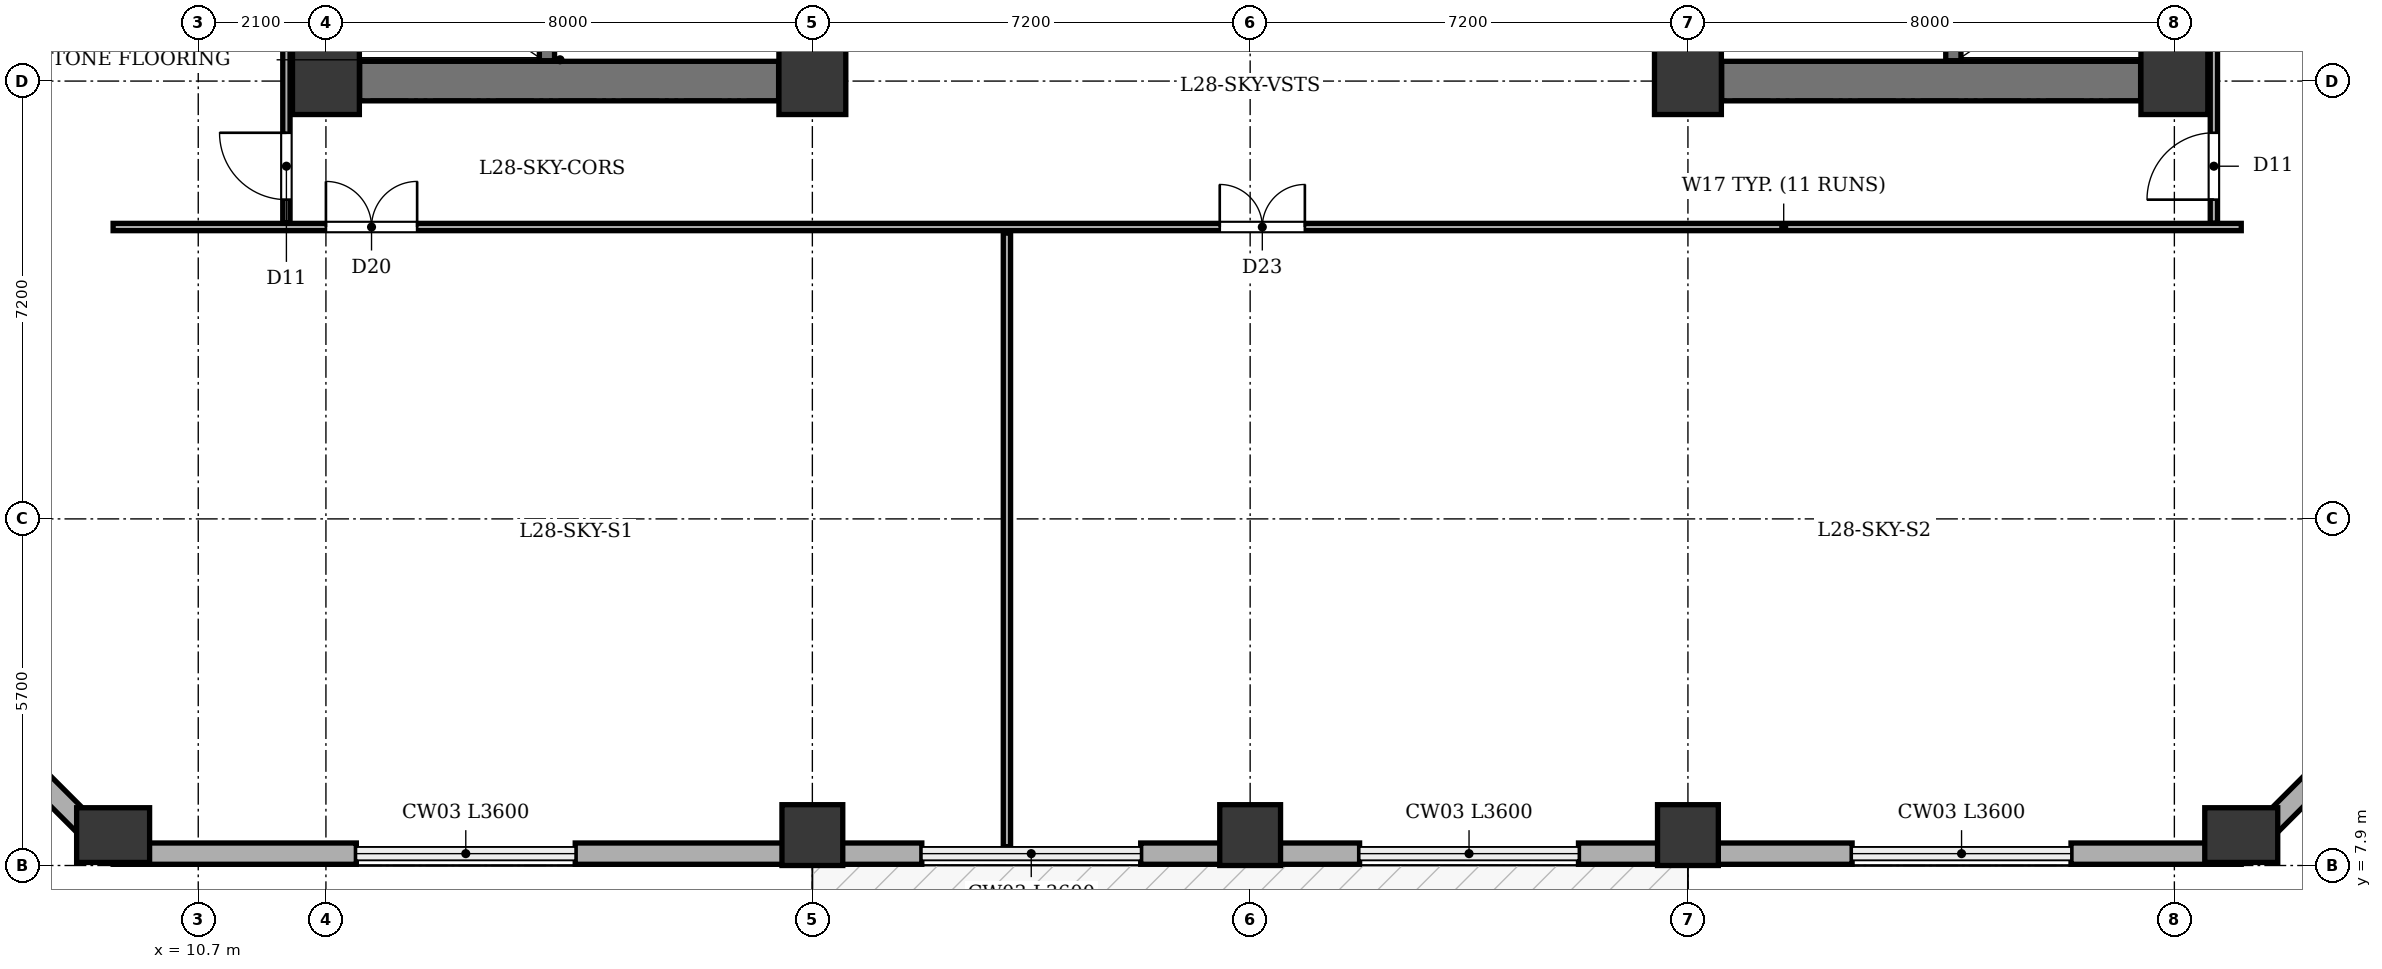
"""IFC4 building model, lengths in metres.
Left out: names, types, materials, properties, quantities, classifications, styles, units other than length and angle.
Written with IfcOpenShell. Run it as: python <this file> out.ifc"""

import sys

from ifc_helpers import new_model, si_unit, direction, frame, frame_2d, origin, origin_2d, place, context, subcontext, project, spatial, rectangle, extrude, element, fill, save


model = new_model("IFC4")
c1 = context("Model", 3, precision=1e-05, world=origin(), true_north=direction((0.0, 1.0)))
c2 = subcontext(c1, "Body", "Model", "MODEL_VIEW")
j1 = project(units=[si_unit("LENGTHUNIT", "METRE"), si_unit("PLANEANGLEUNIT", "RADIAN")], contexts=[c1])
p1 = place(None, origin())
s1 = spatial("IfcSite", under=j1, at=p1, CompositionType="ELEMENT")
p2 = place(p1, origin())
s2 = spatial("IfcBuilding", under=s1, at=p2, CompositionType="ELEMENT")
p3 = place(p2, frame((0.0, 0.0, 115.5)))
s3 = spatial("IfcBuildingStorey", under=s2, at=p3, CompositionType="ELEMENT", Elevation=115.5)
for number, where, z_axis, x_axis in (
    (1, (12.8, 20.8, 0.0), (0.0, 0.0, 1.0), (1.0, 0.0, 0.0)),
    (2, (20.8, 20.8, 0.0), (0.0, 0.0, 1.0), (1.0, 0.0, 0.0)),
    (3, (35.2, 20.8, 0.0), (0.0, 0.0, 1.0), (1.0, 0.0, 0.0)),
    (4, (43.2, 20.8, 0.0), (0.0, 0.0, 1.0), (1.0, 0.0, 0.0)),
):
    element("IfcColumn", number, at=place(p3, frame(where, z_axis=z_axis, x_axis=x_axis)), inside=s3, PredefinedType="COLUMN", context=c2, shape_type="SweptSolid", body=[
        extrude(rectangle(XDim=1.1, YDim=1.1, at=origin_2d()), origin(), (0.0, 0.0, 1.0), 4.8),
    ])
p4 = place(p3, frame((9.3, 8.4, 0.0), z_axis=(0.0, 0.0, 1.0), x_axis=(1.0, 0.0, 0.0)))
e5 = element("IfcColumn", 5, at=p4, inside=s3, PredefinedType="COLUMN", context=c2, shape_type="SweptSolid", body=[
    extrude(rectangle(XDim=0.9, YDim=1.2, at=origin_2d()), origin(), (0.0, 0.0, 1.0), 4.8),
])
for number, where, z_axis, x_axis in (
    (6, (20.8, 8.4, 0.0), (0.0, 0.0, 1.0), (1.0, 0.0, 0.0)),
    (7, (28.0, 8.4, 0.0), (0.0, 0.0, 1.0), (1.0, 0.0, 0.0)),
    (8, (35.2, 8.4, 0.0), (0.0, 0.0, 1.0), (1.0, 0.0, 0.0)),
):
    element("IfcColumn", number, at=place(p3, frame(where, z_axis=z_axis, x_axis=x_axis)), inside=s3, PredefinedType="COLUMN", context=c2, shape_type="SweptSolid", body=[
        extrude(rectangle(XDim=1.0, YDim=1.0, at=origin_2d()), origin(), (0.0, 0.0, 1.0), 4.8),
    ])
p5 = place(p3, frame((44.3, 8.4, 0.0), z_axis=(0.0, 0.0, 1.0), x_axis=(1.0, 0.0, 0.0)))
e9 = element("IfcColumn", 9, at=p5, inside=s3, PredefinedType="COLUMN", context=c2, shape_type="SweptSolid", body=[
    extrude(rectangle(XDim=0.9, YDim=1.2, at=origin_2d()), origin(), (0.0, 0.0, 1.0), 4.8),
])
p6 = place(p3, frame((44.3, 8.095, 0.0), z_axis=(0.0, 0.0, 1.0), x_axis=(-1.0, 0.0, 0.0)))
e10 = element("IfcWall", 10, at=p6, inside=s3, PredefinedType="STANDARD", context=c2, shape_type="SweptSolid", body=[
    extrude(rectangle(XDim=2.8, YDim=0.35, at=frame_2d((1.4, 0.0))), origin(), (0.0, 0.0, 1.0), 3.735),
])
p7 = place(p3, frame((37.9, 8.095, 0.0), z_axis=(0.0, 0.0, 1.0), x_axis=(-1.0, 0.0, 0.0)))
e11 = element("IfcWall", 11, at=p7, inside=s3, PredefinedType="STANDARD", context=c2, shape_type="SweptSolid", body=[
    extrude(rectangle(XDim=4.5, YDim=0.35, at=frame_2d((2.25, 0.0))), origin(), (0.0, 0.0, 1.0), 3.735),
])
p8 = place(p3, frame((29.8, 8.095, 0.0), z_axis=(0.0, 0.0, 1.0), x_axis=(-1.0, 0.0, 0.0)))
e12 = element("IfcWall", 12, at=p8, inside=s3, PredefinedType="STANDARD", context=c2, shape_type="SweptSolid", body=[
    extrude(rectangle(XDim=3.6, YDim=0.35, at=frame_2d((1.8, 0.0))), origin(), (0.0, 0.0, 1.0), 3.735),
])
p9 = place(p3, frame((22.6, 8.095, 0.0), z_axis=(0.0, 0.0, 1.0), x_axis=(-1.0, 0.0, 0.0)))
e13 = element("IfcWall", 13, at=p9, inside=s3, PredefinedType="STANDARD", context=c2, shape_type="SweptSolid", body=[
    extrude(rectangle(XDim=5.7, YDim=0.35, at=frame_2d((2.85, 0.0))), origin(), (0.0, 0.0, 1.0), 3.735),
])
p10 = place(p3, frame((13.3, 8.095, 0.0), z_axis=(0.0, 0.0, 1.0), x_axis=(-1.0, 0.0, 0.0)))
e14 = element("IfcWall", 14, at=p10, inside=s3, PredefinedType="STANDARD", context=c2, shape_type="SweptSolid", body=[
    extrude(rectangle(XDim=4.0, YDim=0.35, at=frame_2d((2.0, 0.0))), origin(), (0.0, 0.0, 1.0), 3.735),
])
for number, where, z_axis, x_axis in (
    (15, (9.3, 8.095, 0.0), (0.0, 0.0, 1.0), (-0.707, 0.707, 0.0)),
    (16, (49.105, 12.9, 0.0), (0.0, 0.0, 1.0), (-0.707, -0.707, 0.0)),
):
    element("IfcWall", number, at=place(p3, frame(where, z_axis=z_axis, x_axis=x_axis)), inside=s3, PredefinedType="STANDARD", context=c2, shape_type="SweptSolid", body=[
        extrude(rectangle(XDim=6.795, YDim=0.35, at=frame_2d((3.397, 0.0))), origin(), (0.0, 0.0, 1.0), 3.735),
    ])
p11 = place(p3, frame((13.355, 20.8, 0.0), z_axis=(0.0, 0.0, 1.0), x_axis=(1.0, 0.0, 0.0)))
e17 = element("IfcWall", 17, at=p11, inside=s3, PredefinedType="SHEAR", context=c2, shape_type="SweptSolid", body=[
    extrude(rectangle(XDim=6.89, YDim=0.65, at=frame_2d((3.445, 0.0))), origin(), (0.0, 0.0, 1.0), 4.35),
])
p12 = place(p3, frame((16.435, 21.135, 0.0), z_axis=(0.0, 0.0, 1.0), x_axis=(0.0, 1.0, 0.0)))
e18 = element("IfcWall", 18, at=p12, inside=s3, PredefinedType="SHEAR", context=c2, shape_type="SweptSolid", body=[
    extrude(rectangle(XDim=12.13, YDim=0.25, at=frame_2d((6.065, 0.0))), origin(), (0.0, 0.0, 1.0), 4.35),
])
p13 = place(p12, frame((0.515, 0.0, 0.0)))
e19 = element("IfcOpeningElement", 19, at=p13, cuts=e18, PredefinedType="OPENING", context=c2, shape_type="SweptSolid", body=[
    extrude(rectangle(XDim=1.2, YDim=2.15, at=frame_2d((0.6, 1.075))), frame((0.0, 0.135, 0.0), z_axis=(0.0, -1.0, 0.0), x_axis=(1.0, 0.0, 0.0)), (0.0, 0.0, 1.0), 0.27),
])
p14 = place(p12, frame((2.665, 0.0, 0.0)))
e20 = element("IfcOpeningElement", 20, at=p14, cuts=e18, PredefinedType="OPENING", context=c2, shape_type="SweptSolid", body=[
    extrude(rectangle(XDim=1.15, YDim=2.15, at=frame_2d((0.575, 1.075))), frame((0.0, 0.135, 0.0), z_axis=(0.0, -1.0, 0.0), x_axis=(1.0, 0.0, 0.0)), (0.0, 0.0, 1.0), 0.27),
])
p15 = place(p3, frame((35.755, 20.8, 0.0), z_axis=(0.0, 0.0, 1.0), x_axis=(1.0, 0.0, 0.0)))
e21 = element("IfcWall", 21, at=p15, inside=s3, PredefinedType="SHEAR", context=c2, shape_type="SweptSolid", body=[
    extrude(rectangle(XDim=6.89, YDim=0.65, at=frame_2d((3.445, 0.0))), origin(), (0.0, 0.0, 1.0), 4.35),
])
p16 = place(p3, frame((39.565, 21.135, 0.0), z_axis=(0.0, 0.0, 1.0), x_axis=(0.0, 1.0, 0.0)))
e22 = element("IfcWall", 22, at=p16, inside=s3, PredefinedType="SHEAR", context=c2, shape_type="SweptSolid", body=[
    extrude(rectangle(XDim=12.13, YDim=0.25, at=frame_2d((6.065, 0.0))), origin(), (0.0, 0.0, 1.0), 4.35),
])
p17 = place(p16, frame((0.515, 0.0, 0.0)))
e23 = element("IfcOpeningElement", 23, at=p17, cuts=e22, PredefinedType="OPENING", context=c2, shape_type="SweptSolid", body=[
    extrude(rectangle(XDim=1.2, YDim=2.15, at=frame_2d((0.6, 1.075))), frame((0.0, 0.135, 0.0), z_axis=(0.0, -1.0, 0.0), x_axis=(1.0, 0.0, 0.0)), (0.0, 0.0, 1.0), 0.27),
])
p18 = place(p16, frame((2.665, 0.0, 0.0)))
e24 = element("IfcOpeningElement", 24, at=p18, cuts=e22, PredefinedType="OPENING", context=c2, shape_type="SweptSolid", body=[
    extrude(rectangle(XDim=1.15, YDim=2.15, at=frame_2d((0.575, 1.075))), frame((0.0, 0.135, 0.0), z_axis=(0.0, -1.0, 0.0), x_axis=(1.0, 0.0, 0.0)), (0.0, 0.0, 1.0), 0.27),
])
p19 = place(p3, frame((9.3, 18.4, 0.0), z_axis=(0.0, 0.0, 1.0), x_axis=(1.0, 0.0, 0.0)))
e25 = element("IfcWall", 25, at=p19, inside=s3, PredefinedType="PARTITIONING", context=c2, shape_type="SweptSolid", body=[
    extrude(rectangle(XDim=35.0, YDim=0.12, at=frame_2d((17.5, 0.0))), origin(), (0.0, 0.0, 1.0), 4.35),
])
p20 = place(p19, frame((3.5, 0.0, 0.0)))
e26 = element("IfcOpeningElement", 26, at=p20, cuts=e25, PredefinedType="OPENING", context=c2, shape_type="SweptSolid", body=[
    extrude(rectangle(XDim=1.5, YDim=2.15, at=frame_2d((0.75, 1.075))), frame((0.0, 0.07, 0.0), z_axis=(0.0, -1.0, 0.0), x_axis=(1.0, 0.0, 0.0)), (0.0, 0.0, 1.0), 0.14),
])
p21 = place(p19, frame((18.2, 0.0, 0.0)))
e27 = element("IfcOpeningElement", 27, at=p21, cuts=e25, PredefinedType="OPENING", context=c2, shape_type="SweptSolid", body=[
    extrude(rectangle(XDim=1.4, YDim=2.15, at=frame_2d((0.7, 1.075))), frame((0.0, 0.07, 0.0), z_axis=(0.0, -1.0, 0.0), x_axis=(1.0, 0.0, 0.0)), (0.0, 0.0, 1.0), 0.14),
])
p22 = place(p3, frame((24.0, 8.21, 0.0), z_axis=(0.0, 0.0, 1.0), x_axis=(0.0, 1.0, 0.0)))
e28 = element("IfcWall", 28, at=p22, inside=s3, PredefinedType="PARTITIONING", context=c2, shape_type="SweptSolid", body=[
    extrude(rectangle(XDim=10.09, YDim=0.12, at=frame_2d((5.045, 0.0))), origin(), (0.0, 0.0, 1.0), 3.785),
])
p23 = place(p3, frame((12.15, 18.465, 0.0), z_axis=(0.0, 0.0, 1.0), x_axis=(0.0, 1.0, 0.0)))
e29 = element("IfcWall", 29, at=p23, inside=s3, PredefinedType="PARTITIONING", context=c2, shape_type="SweptSolid", body=[
    extrude(rectangle(XDim=17.67, YDim=0.12, at=frame_2d((8.835, 0.0))), origin(), (0.0, 0.0, 1.0), 4.35),
])
p24 = place(p23, frame((0.385, 0.0, 0.0)))
e30 = element("IfcOpeningElement", 30, at=p24, cuts=e29, PredefinedType="OPENING", context=c2, shape_type="SweptSolid", body=[
    extrude(rectangle(XDim=1.1, YDim=2.15, at=frame_2d((0.55, 1.075))), frame((0.0, 0.07, 0.0), z_axis=(0.0, -1.0, 0.0), x_axis=(1.0, 0.0, 0.0)), (0.0, 0.0, 1.0), 0.14),
])
p25 = place(p3, frame((43.85, 18.465, 0.0), z_axis=(0.0, 0.0, 1.0), x_axis=(0.0, 1.0, 0.0)))
e31 = element("IfcWall", 31, at=p25, inside=s3, PredefinedType="PARTITIONING", context=c2, shape_type="SweptSolid", body=[
    extrude(rectangle(XDim=17.67, YDim=0.12, at=frame_2d((8.835, 0.0))), origin(), (0.0, 0.0, 1.0), 2.935),
])
p26 = place(p25, frame((0.385, 0.0, 0.0)))
e32 = element("IfcOpeningElement", 32, at=p26, cuts=e31, PredefinedType="OPENING", context=c2, shape_type="SweptSolid", body=[
    extrude(rectangle(XDim=1.1, YDim=2.15, at=frame_2d((0.55, 1.075))), frame((0.0, 0.07, 0.0), z_axis=(0.0, -1.0, 0.0), x_axis=(1.0, 0.0, 0.0)), (0.0, 0.0, 1.0), 0.14),
])
p27 = place(p20, origin())
e33 = element("IfcDoor", 33, at=p27, inside=s3, OperationType="DOUBLE_DOOR_SINGLE_SWING", PredefinedType="DOOR", context=c2, shape_type="SweptSolid", body=[
    extrude(rectangle(XDim=1.5, YDim=2.15, at=frame_2d((0.75, 1.075))), frame((0.0, 0.025, 0.0), z_axis=(0.0, -1.0, 0.0), x_axis=(1.0, 0.0, 0.0)), (0.0, 0.0, 1.0), 0.05),
])
fill(e26, e33)
p28 = place(p21, origin())
e34 = element("IfcDoor", 34, at=p28, inside=s3, OperationType="DOUBLE_DOOR_SINGLE_SWING", PredefinedType="DOOR", context=c2, shape_type="SweptSolid", body=[
    extrude(rectangle(XDim=1.4, YDim=2.15, at=frame_2d((0.7, 1.075))), frame((0.0, 0.025, 0.0), z_axis=(0.0, -1.0, 0.0), x_axis=(1.0, 0.0, 0.0)), (0.0, 0.0, 1.0), 0.05),
])
fill(e27, e34)
p29 = place(p24, origin())
e35 = element("IfcDoor", 35, at=p29, inside=s3, OperationType="SINGLE_SWING_RIGHT", PredefinedType="DOOR", context=c2, shape_type="SweptSolid", body=[
    extrude(rectangle(XDim=1.1, YDim=2.15, at=frame_2d((0.55, 1.075))), frame((0.0, 0.025, 0.0), z_axis=(0.0, -1.0, 0.0), x_axis=(1.0, 0.0, 0.0)), (0.0, 0.0, 1.0), 0.05),
])
fill(e30, e35)
p30 = place(p26, origin())
e36 = element("IfcDoor", 36, at=p30, inside=s3, OperationType="SINGLE_SWING_LEFT", PredefinedType="DOOR", context=c2, shape_type="SweptSolid", body=[
    extrude(rectangle(XDim=1.1, YDim=2.15, at=frame_2d((0.55, 1.075))), frame((0.0, 0.025, 0.0), z_axis=(0.0, -1.0, 0.0), x_axis=(1.0, 0.0, 0.0)), (0.0, 0.0, 1.0), 0.05),
])
fill(e32, e36)
save(model, sys.argv[1])
